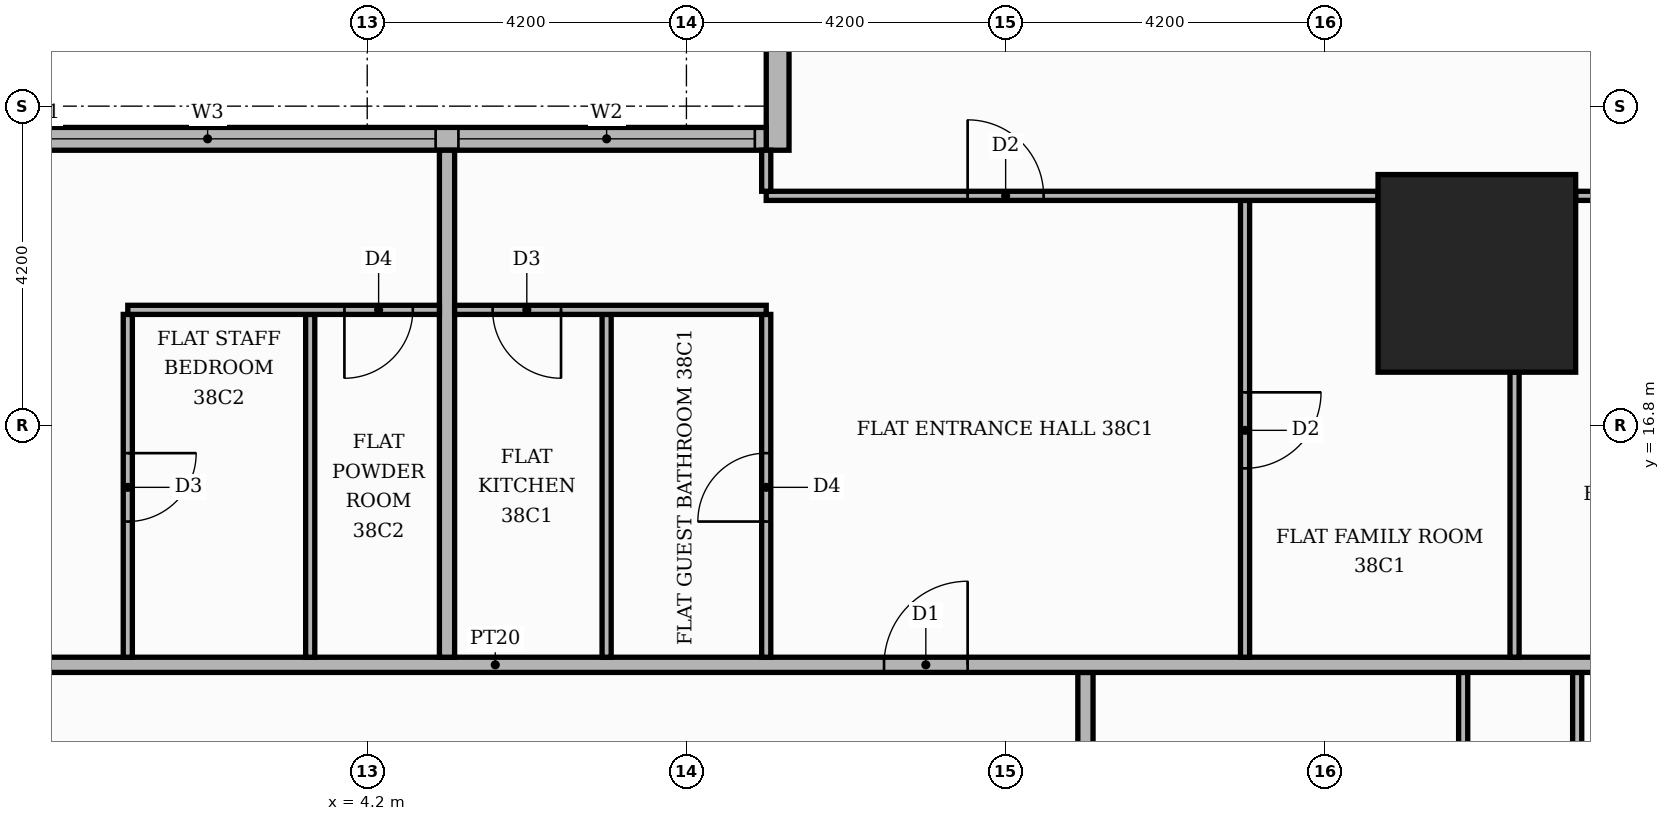
"""IFC4 building model, lengths in metres.
Left out: names, types, materials, properties, quantities, classifications, styles, units other than length and angle.
Written with IfcOpenShell. Run it as: python <this file> out.ifc"""

import sys

from ifc_helpers import new_model, si_unit, direction, frame, frame_2d, origin, origin_2d, place, context, subcontext, project, spatial, rectangle, extrude, element, fill, save


model = new_model("IFC4")
c1 = context("Model", 3, precision=1e-05, world=origin(), true_north=direction((0.0, 1.0)))
c2 = subcontext(c1, "Body", "Model", "MODEL_VIEW")
j1 = project(units=[si_unit("LENGTHUNIT", "METRE"), si_unit("PLANEANGLEUNIT", "RADIAN")], contexts=[c1])
p1 = place(None, origin())
s1 = spatial("IfcSite", under=j1, at=p1, CompositionType="ELEMENT")
p2 = place(p1, origin())
s2 = spatial("IfcBuilding", under=s1, at=p2, CompositionType="ELEMENT")
p3 = place(p2, frame((0.0, 0.0, 161.1)))
s3 = spatial("IfcBuildingStorey", under=s2, at=p3, CompositionType="ELEMENT", Elevation=161.1)
p4 = place(p3, frame((18.8, 18.8, 0.0), z_axis=(0.0, 0.0, 1.0), x_axis=(1.0, 0.0, 0.0)))
e1 = element("IfcColumn", 1, at=p4, inside=s3, PredefinedType="COLUMN", context=c2, shape_type="SweptSolid", body=[
    extrude(rectangle(XDim=2.6, YDim=2.6, at=origin_2d()), origin(), (0.0, 0.0, 1.0), 3.9),
])
p5 = place(p3, frame((9.6, 25.42, 0.0), z_axis=(0.0, 0.0, 1.0), x_axis=(0.0, -1.0, 0.0)))
e2 = element("IfcWall", 2, at=p5, inside=s3, PredefinedType="STANDARD", context=c2, shape_type="SweptSolid", body=[
    extrude(rectangle(XDim=5.0, YDim=0.3, at=frame_2d((2.5, 0.0))), origin(), (0.0, 0.0, 1.0), 3.48),
])
p6 = place(p5, frame((1.42, 0.0, 0.9)))
e3 = element("IfcOpeningElement", 3, at=p6, cuts=e2, PredefinedType="OPENING", context=c2, shape_type="SweptSolid", body=[
    extrude(rectangle(XDim=1.8, YDim=2.1, at=frame_2d((0.9, 1.05))), frame((0.0, 0.16, 0.0), z_axis=(0.0, -1.0, 0.0), x_axis=(1.0, 0.0, 0.0)), (0.0, 0.0, 1.0), 0.32),
])
p7 = place(p3, frame((9.45, 20.57, 0.0), z_axis=(0.0, 0.0, 1.0), x_axis=(-1.0, 0.0, 0.0)))
e4 = element("IfcWall", 4, at=p7, inside=s3, PredefinedType="STANDARD", context=c2, shape_type="SweptSolid", body=[
    extrude(rectangle(XDim=19.2, YDim=0.3, at=frame_2d((9.6, 0.0))), origin(), (0.0, 0.0, 1.0), 3.48),
])
p8 = place(p7, frame((0.15, 0.0, 0.9)))
e5 = element("IfcOpeningElement", 5, at=p8, cuts=e4, PredefinedType="OPENING", context=c2, shape_type="SweptSolid", body=[
    extrude(rectangle(XDim=3.9, YDim=2.1, at=frame_2d((1.95, 1.05))), frame((0.0, 0.16, 0.0), z_axis=(0.0, -1.0, 0.0), x_axis=(1.0, 0.0, 0.0)), (0.0, 0.0, 1.0), 0.32),
])
p9 = place(p7, frame((4.35, 0.0, 0.9)))
e6 = element("IfcOpeningElement", 6, at=p9, cuts=e4, PredefinedType="OPENING", context=c2, shape_type="SweptSolid", body=[
    extrude(rectangle(XDim=6.0, YDim=2.1, at=frame_2d((3.0, 1.05))), frame((0.0, 0.16, 0.0), z_axis=(0.0, -1.0, 0.0), x_axis=(1.0, 0.0, 0.0)), (0.0, 0.0, 1.0), 0.32),
])
p10 = place(p7, frame((10.65, 0.0, 0.9)))
e7 = element("IfcOpeningElement", 7, at=p10, cuts=e4, PredefinedType="OPENING", context=c2, shape_type="SweptSolid", body=[
    extrude(rectangle(XDim=6.0, YDim=2.1, at=frame_2d((3.0, 1.05))), frame((0.0, 0.16, 0.0), z_axis=(0.0, -1.0, 0.0), x_axis=(1.0, 0.0, 0.0)), (0.0, 0.0, 1.0), 0.32),
])
p11 = place(p7, frame((16.95, 0.0, 0.9)))
e8 = element("IfcOpeningElement", 8, at=p11, cuts=e4, PredefinedType="OPENING", context=c2, shape_type="SweptSolid", body=[
    extrude(rectangle(XDim=1.8, YDim=2.1, at=frame_2d((0.9, 1.05))), frame((0.0, 0.16, 0.0), z_axis=(0.0, -1.0, 0.0), x_axis=(1.0, 0.0, 0.0)), (0.0, 0.0, 1.0), 0.32),
])
p12 = place(p3, frame((18.62, 9.36, 0.0), z_axis=(0.0, 0.0, 1.0), x_axis=(0.0, 1.0, 0.0)))
e9 = element("IfcWall", 9, at=p12, inside=s3, PredefinedType="PARTITIONING", context=c2, shape_type="SweptSolid", body=[
    extrude(rectangle(XDim=4.19, YDim=0.12, at=frame_2d((2.095, 0.0))), origin(), (0.0, 0.0, 1.0), 3.48),
])
p13 = place(p12, frame((1.665, 0.0, 0.0)))
e10 = element("IfcOpeningElement", 10, at=p13, cuts=e9, PredefinedType="OPENING", context=c2, shape_type="SweptSolid", body=[
    extrude(rectangle(XDim=0.9, YDim=2.1, at=frame_2d((0.45, 1.05))), frame((0.0, 0.07, 0.0), z_axis=(0.0, -1.0, 0.0), x_axis=(1.0, 0.0, 0.0)), (0.0, 0.0, 1.0), 0.14),
])
p14 = place(p3, frame((13.65, 11.1, 0.0), z_axis=(0.0, 0.0, 1.0), x_axis=(0.0, 1.0, 0.0)))
e11 = element("IfcWall", 11, at=p14, inside=s3, PredefinedType="PARTITIONING", context=c2, shape_type="SweptSolid", body=[
    extrude(rectangle(XDim=2.45, YDim=0.2, at=frame_2d((1.225, 0.0))), origin(), (0.0, 0.0, 1.0), 3.48),
])
p15 = place(p3, frame((20.12, 11.61, 0.0), z_axis=(0.0, 0.0, 1.0), x_axis=(0.0, 1.0, 0.0)))
e12 = element("IfcWall", 12, at=p15, inside=s3, PredefinedType="PARTITIONING", context=c2, shape_type="SweptSolid", body=[
    extrude(rectangle(XDim=1.94, YDim=0.12, at=frame_2d((0.97, 0.0))), origin(), (0.0, 0.0, 1.0), 3.48),
])
p16 = place(p3, frame((-13.65, 13.65, 0.0), z_axis=(0.0, 0.0, 1.0), x_axis=(1.0, 0.0, 0.0)))
e13 = element("IfcWall", 13, at=p16, inside=s3, PredefinedType="PARTITIONING", context=c2, shape_type="SweptSolid", body=[
    extrude(rectangle(XDim=39.07, YDim=0.2, at=frame_2d((19.535, 0.0))), origin(), (0.0, 0.0, 1.0), 3.48),
])
p17 = place(p16, frame((24.65, 0.0, 0.0)))
e14 = element("IfcOpeningElement", 14, at=p17, cuts=e13, PredefinedType="OPENING", context=c2, shape_type="SweptSolid", body=[
    extrude(rectangle(XDim=1.1, YDim=2.4, at=frame_2d((0.55, 1.2))), frame((0.0, 0.11, 0.0), z_axis=(0.0, -1.0, 0.0), x_axis=(1.0, 0.0, 0.0)), (0.0, 0.0, 1.0), 0.22),
])
p18 = place(p16, frame((12.05, 0.0, 0.0)))
e15 = element("IfcOpeningElement", 15, at=p18, cuts=e13, PredefinedType="OPENING", context=c2, shape_type="SweptSolid", body=[
    extrude(rectangle(XDim=1.1, YDim=2.4, at=frame_2d((0.55, 1.2))), frame((0.0, 0.11, 0.0), z_axis=(0.0, -1.0, 0.0), x_axis=(1.0, 0.0, 0.0)), (0.0, 0.0, 1.0), 0.22),
])
p19 = place(p3, frame((1.05, 13.75, 0.0), z_axis=(0.0, 0.0, 1.0), x_axis=(0.0, 1.0, 0.0)))
e16 = element("IfcWall", 16, at=p19, inside=s3, PredefinedType="PARTITIONING", context=c2, shape_type="SweptSolid", body=[
    extrude(rectangle(XDim=4.51, YDim=0.12, at=frame_2d((2.255, 0.0))), origin(), (0.0, 0.0, 1.0), 3.48),
])
p20 = place(p19, frame((1.785, 0.0, 0.0)))
e17 = element("IfcOpeningElement", 17, at=p20, cuts=e16, PredefinedType="OPENING", context=c2, shape_type="SweptSolid", body=[
    extrude(rectangle(XDim=0.9, YDim=2.1, at=frame_2d((0.45, 1.05))), frame((0.0, 0.07, 0.0), z_axis=(0.0, -1.0, 0.0), x_axis=(1.0, 0.0, 0.0)), (0.0, 0.0, 1.0), 0.14),
])
p21 = place(p3, frame((3.45, 13.75, 0.0), z_axis=(0.0, 0.0, 1.0), x_axis=(0.0, 1.0, 0.0)))
e18 = element("IfcWall", 18, at=p21, inside=s3, PredefinedType="PARTITIONING", context=c2, shape_type="SweptSolid", body=[
    extrude(rectangle(XDim=4.51, YDim=0.12, at=frame_2d((2.255, 0.0))), origin(), (0.0, 0.0, 1.0), 3.48),
])
p22 = place(p3, frame((5.25, 13.75, 0.0), z_axis=(0.0, 0.0, 1.0), x_axis=(0.0, 1.0, 0.0)))
e19 = element("IfcWall", 19, at=p22, inside=s3, PredefinedType="PARTITIONING", context=c2, shape_type="SweptSolid", body=[
    extrude(rectangle(XDim=6.67, YDim=0.2, at=frame_2d((3.335, 0.0))), origin(), (0.0, 0.0, 1.0), 3.48),
])
p23 = place(p3, frame((7.35, 13.75, 0.0), z_axis=(0.0, 0.0, 1.0), x_axis=(0.0, 1.0, 0.0)))
e20 = element("IfcWall", 20, at=p23, inside=s3, PredefinedType="PARTITIONING", context=c2, shape_type="SweptSolid", body=[
    extrude(rectangle(XDim=4.51, YDim=0.12, at=frame_2d((2.255, 0.0))), origin(), (0.0, 0.0, 1.0), 3.48),
])
p24 = place(p3, frame((9.45, 13.75, 0.0), z_axis=(0.0, 0.0, 1.0), x_axis=(0.0, 1.0, 0.0)))
e21 = element("IfcWall", 21, at=p24, inside=s3, PredefinedType="PARTITIONING", context=c2, shape_type="SweptSolid", body=[
    extrude(rectangle(XDim=4.51, YDim=0.12, at=frame_2d((2.255, 0.0))), origin(), (0.0, 0.0, 1.0), 3.48),
])
p25 = place(p24, frame((1.785, 0.0, 0.0)))
e22 = element("IfcOpeningElement", 22, at=p25, cuts=e21, PredefinedType="OPENING", context=c2, shape_type="SweptSolid", body=[
    extrude(rectangle(XDim=0.9, YDim=2.1, at=frame_2d((0.45, 1.05))), frame((0.0, 0.07, 0.0), z_axis=(0.0, -1.0, 0.0), x_axis=(1.0, 0.0, 0.0)), (0.0, 0.0, 1.0), 0.14),
])
p26 = place(p3, frame((15.75, 13.75, 0.0), z_axis=(0.0, 0.0, 1.0), x_axis=(0.0, 1.0, 0.0)))
e23 = element("IfcWall", 23, at=p26, inside=s3, PredefinedType="PARTITIONING", context=c2, shape_type="SweptSolid", body=[
    extrude(rectangle(XDim=6.01, YDim=0.12, at=frame_2d((3.005, 0.0))), origin(), (0.0, 0.0, 1.0), 3.48),
])
p27 = place(p26, frame((2.485, 0.0, 0.0)))
e24 = element("IfcOpeningElement", 24, at=p27, cuts=e23, PredefinedType="OPENING", context=c2, shape_type="SweptSolid", body=[
    extrude(rectangle(XDim=1.0, YDim=2.1, at=frame_2d((0.5, 1.05))), frame((0.0, 0.07, 0.0), z_axis=(0.0, -1.0, 0.0), x_axis=(1.0, 0.0, 0.0)), (0.0, 0.0, 1.0), 0.14),
])
p28 = place(p3, frame((19.296, 13.75, 0.0), z_axis=(0.0, 0.0, 1.0), x_axis=(0.0, 1.0, 0.0)))
e25 = element("IfcWall", 25, at=p28, inside=s3, PredefinedType="PARTITIONING", context=c2, shape_type="SweptSolid", body=[
    extrude(rectangle(XDim=3.75, YDim=0.12, at=frame_2d((1.875, 0.0))), origin(), (0.0, 0.0, 1.0), 3.48),
])
p29 = place(p3, frame((1.05, 18.32, 0.0), z_axis=(0.0, 0.0, 1.0), x_axis=(1.0, 0.0, 0.0)))
e26 = element("IfcWall", 26, at=p29, inside=s3, PredefinedType="PARTITIONING", context=c2, shape_type="SweptSolid", body=[
    extrude(rectangle(XDim=4.1, YDim=0.12, at=frame_2d((2.05, 0.0))), origin(), (0.0, 0.0, 1.0), 3.48),
])
p30 = place(p29, frame((2.85, 0.0, 0.0)))
e27 = element("IfcOpeningElement", 27, at=p30, cuts=e26, PredefinedType="OPENING", context=c2, shape_type="SweptSolid", body=[
    extrude(rectangle(XDim=0.9, YDim=2.1, at=frame_2d((0.45, 1.05))), frame((0.0, 0.07, 0.0), z_axis=(0.0, -1.0, 0.0), x_axis=(1.0, 0.0, 0.0)), (0.0, 0.0, 1.0), 0.14),
])
p31 = place(p3, frame((5.35, 18.32, 0.0), z_axis=(0.0, 0.0, 1.0), x_axis=(1.0, 0.0, 0.0)))
e28 = element("IfcWall", 28, at=p31, inside=s3, PredefinedType="PARTITIONING", context=c2, shape_type="SweptSolid", body=[
    extrude(rectangle(XDim=4.1, YDim=0.12, at=frame_2d((2.05, 0.0))), origin(), (0.0, 0.0, 1.0), 3.48),
])
p32 = place(p31, frame((0.5, 0.0, 0.0)))
e29 = element("IfcOpeningElement", 29, at=p32, cuts=e28, PredefinedType="OPENING", context=c2, shape_type="SweptSolid", body=[
    extrude(rectangle(XDim=0.9, YDim=2.1, at=frame_2d((0.45, 1.05))), frame((0.0, 0.07, 0.0), z_axis=(0.0, -1.0, 0.0), x_axis=(1.0, 0.0, 0.0)), (0.0, 0.0, 1.0), 0.14),
])
p33 = place(p3, frame((9.45, 19.82, 0.0), z_axis=(0.0, 0.0, 1.0), x_axis=(1.0, 0.0, 0.0)))
e30 = element("IfcWall", 30, at=p33, inside=s3, PredefinedType="PARTITIONING", context=c2, shape_type="SweptSolid", body=[
    extrude(rectangle(XDim=8.05, YDim=0.12, at=frame_2d((4.025, 0.0))), origin(), (0.0, 0.0, 1.0), 3.48),
])
p34 = place(p33, frame((2.65, 0.0, 0.0)))
e31 = element("IfcOpeningElement", 31, at=p34, cuts=e30, PredefinedType="OPENING", context=c2, shape_type="SweptSolid", body=[
    extrude(rectangle(XDim=1.0, YDim=2.1, at=frame_2d((0.5, 1.05))), frame((0.0, 0.07, 0.0), z_axis=(0.0, -1.0, 0.0), x_axis=(1.0, 0.0, 0.0)), (0.0, 0.0, 1.0), 0.14),
])
p35 = place(p3, frame((20.1, 19.82, 0.0), z_axis=(0.0, 0.0, 1.0), x_axis=(1.0, 0.0, 0.0)))
e32 = element("IfcWall", 32, at=p35, inside=s3, PredefinedType="PARTITIONING", context=c2, shape_type="SweptSolid", body=[
    extrude(rectangle(XDim=5.32, YDim=0.12, at=frame_2d((2.66, 0.0))), origin(), (0.0, 0.0, 1.0), 3.48),
])
p36 = place(p35, frame((2.36, 0.0, 0.0)))
e33 = element("IfcOpeningElement", 33, at=p36, cuts=e32, PredefinedType="OPENING", context=c2, shape_type="SweptSolid", body=[
    extrude(rectangle(XDim=0.9, YDim=2.1, at=frame_2d((0.45, 1.05))), frame((0.0, 0.07, 0.0), z_axis=(0.0, -1.0, 0.0), x_axis=(1.0, 0.0, 0.0)), (0.0, 0.0, 1.0), 0.14),
])
p37 = place(p3, frame((9.45, 19.88, 0.0), z_axis=(0.0, 0.0, 1.0), x_axis=(0.0, 1.0, 0.0)))
e34 = element("IfcWall", 34, at=p37, inside=s3, PredefinedType="PARTITIONING", context=c2, shape_type="SweptSolid", body=[
    extrude(rectangle(XDim=0.54, YDim=0.12, at=frame_2d((0.27, 0.0))), origin(), (0.0, 0.0, 1.0), 3.48),
])
p38 = place(p8, origin())
e35 = element("IfcWindow", 35, at=p38, inside=s3, PartitioningType="SINGLE_PANEL", PredefinedType="WINDOW", context=c2, shape_type="SweptSolid", body=[
    extrude(rectangle(XDim=3.9, YDim=2.1, at=frame_2d((1.95, 1.05))), frame((0.0, 0.03, 0.0), z_axis=(0.0, -1.0, 0.0), x_axis=(1.0, 0.0, 0.0)), (0.0, 0.0, 1.0), 0.06),
])
fill(e5, e35)
p39 = place(p9, origin())
e36 = element("IfcWindow", 36, at=p39, inside=s3, PartitioningType="SINGLE_PANEL", PredefinedType="WINDOW", context=c2, shape_type="SweptSolid", body=[
    extrude(rectangle(XDim=6.0, YDim=2.1, at=frame_2d((3.0, 1.05))), frame((0.0, 0.03, 0.0), z_axis=(0.0, -1.0, 0.0), x_axis=(1.0, 0.0, 0.0)), (0.0, 0.0, 1.0), 0.06),
])
fill(e6, e36)
p40 = place(p17, origin())
e37 = element("IfcDoor", 37, at=p40, inside=s3, OperationType="SINGLE_SWING_RIGHT", PredefinedType="DOOR", context=c2, shape_type="SweptSolid", body=[
    extrude(rectangle(XDim=1.1, YDim=2.4, at=frame_2d((0.55, 1.2))), frame((0.0, 0.025, 0.0), z_axis=(0.0, -1.0, 0.0), x_axis=(1.0, 0.0, 0.0)), (0.0, 0.0, 1.0), 0.05),
])
fill(e14, e37)
p41 = place(p27, frame((1.0, 0.0, 0.0), z_axis=(0.0, 0.0, 1.0), x_axis=(-1.0, 0.0, 0.0)))
e38 = element("IfcDoor", 38, at=p41, inside=s3, OperationType="SINGLE_SWING_RIGHT", PredefinedType="DOOR", context=c2, shape_type="SweptSolid", body=[
    extrude(rectangle(XDim=1.0, YDim=2.1, at=frame_2d((0.5, 1.05))), frame((0.0, 0.025, 0.0), z_axis=(0.0, -1.0, 0.0), x_axis=(1.0, 0.0, 0.0)), (0.0, 0.0, 1.0), 0.05),
])
fill(e24, e38)
p42 = place(p25, origin())
e39 = element("IfcDoor", 39, at=p42, inside=s3, OperationType="SINGLE_SWING_LEFT", PredefinedType="DOOR", context=c2, shape_type="SweptSolid", body=[
    extrude(rectangle(XDim=0.9, YDim=2.1, at=frame_2d((0.45, 1.05))), frame((0.0, 0.025, 0.0), z_axis=(0.0, -1.0, 0.0), x_axis=(1.0, 0.0, 0.0)), (0.0, 0.0, 1.0), 0.05),
])
fill(e22, e39)
p43 = place(p32, frame((0.9, 0.0, 0.0), z_axis=(0.0, 0.0, 1.0), x_axis=(-1.0, 0.0, 0.0)))
e40 = element("IfcDoor", 40, at=p43, inside=s3, OperationType="SINGLE_SWING_RIGHT", PredefinedType="DOOR", context=c2, shape_type="SweptSolid", body=[
    extrude(rectangle(XDim=0.9, YDim=2.1, at=frame_2d((0.45, 1.05))), frame((0.0, 0.025, 0.0), z_axis=(0.0, -1.0, 0.0), x_axis=(1.0, 0.0, 0.0)), (0.0, 0.0, 1.0), 0.05),
])
fill(e29, e40)
p44 = place(p34, origin())
e41 = element("IfcDoor", 41, at=p44, inside=s3, OperationType="SINGLE_SWING_LEFT", PredefinedType="DOOR", context=c2, shape_type="SweptSolid", body=[
    extrude(rectangle(XDim=1.0, YDim=2.1, at=frame_2d((0.5, 1.05))), frame((0.0, 0.025, 0.0), z_axis=(0.0, -1.0, 0.0), x_axis=(1.0, 0.0, 0.0)), (0.0, 0.0, 1.0), 0.05),
])
fill(e31, e41)
p45 = place(p30, frame((0.9, 0.0, 0.0), z_axis=(0.0, 0.0, 1.0), x_axis=(-1.0, 0.0, 0.0)))
e42 = element("IfcDoor", 42, at=p45, inside=s3, OperationType="SINGLE_SWING_LEFT", PredefinedType="DOOR", context=c2, shape_type="SweptSolid", body=[
    extrude(rectangle(XDim=0.9, YDim=2.1, at=frame_2d((0.45, 1.05))), frame((0.0, 0.025, 0.0), z_axis=(0.0, -1.0, 0.0), x_axis=(1.0, 0.0, 0.0)), (0.0, 0.0, 1.0), 0.05),
])
fill(e27, e42)
p46 = place(p20, frame((0.9, 0.0, 0.0), z_axis=(0.0, 0.0, 1.0), x_axis=(-1.0, 0.0, 0.0)))
e43 = element("IfcDoor", 43, at=p46, inside=s3, OperationType="SINGLE_SWING_RIGHT", PredefinedType="DOOR", context=c2, shape_type="SweptSolid", body=[
    extrude(rectangle(XDim=0.9, YDim=2.1, at=frame_2d((0.45, 1.05))), frame((0.0, 0.025, 0.0), z_axis=(0.0, -1.0, 0.0), x_axis=(1.0, 0.0, 0.0)), (0.0, 0.0, 1.0), 0.05),
])
fill(e17, e43)
save(model, sys.argv[1])
